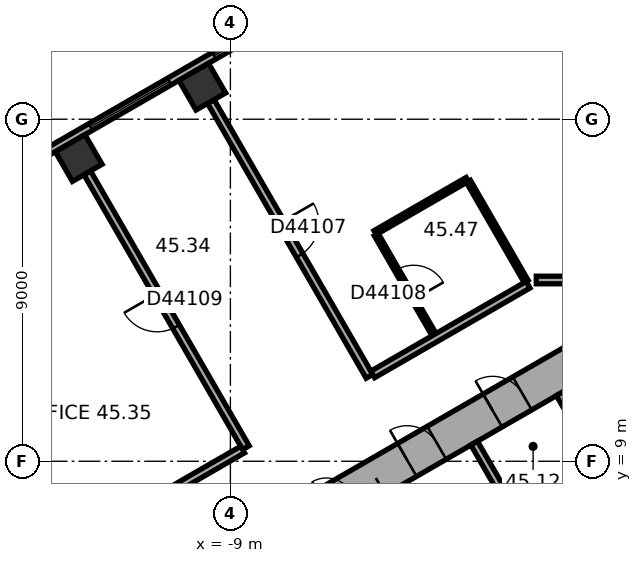
"""IFC4 building model, lengths in metres.
Left out: names, types, materials, properties, quantities, classifications, styles, units other than length and angle.
Written with IfcOpenShell. Run it as: python <this file> out.ifc"""

import sys

from ifc_helpers import new_model, si_unit, direction, frame, frame_2d, origin, origin_2d, place, context, subcontext, project, spatial, rectangle, extrude, element, fill, save


model = new_model("IFC4")
c1 = context("Model", 3, precision=1e-05, world=origin(), true_north=direction((0.0, 1.0)))
c2 = subcontext(c1, "Body", "Model", "MODEL_VIEW")
j1 = project(units=[si_unit("LENGTHUNIT", "METRE"), si_unit("PLANEANGLEUNIT", "RADIAN")], contexts=[c1])
p1 = place(None, origin())
s1 = spatial("IfcSite", under=j1, at=p1, CompositionType="ELEMENT")
p2 = place(p1, origin())
s2 = spatial("IfcBuilding", under=s1, at=p2, CompositionType="ELEMENT")
p3 = place(p2, frame((0.0, 0.0, 183.6)))
s3 = spatial("IfcBuildingStorey", under=s2, at=p3, CompositionType="ELEMENT", Elevation=183.6)
for number, where, z_axis, x_axis in (
    (1, (-9.74, 18.856, 0.0), (0.0, 0.0, 1.0), (-0.866, -0.5, 0.0)),
    (2, (-12.991, 16.979, 0.0), (0.0, 0.0, 1.0), (-0.866, -0.5, 0.0)),
):
    element("IfcColumn", number, at=place(p3, frame(where, z_axis=z_axis, x_axis=x_axis)), inside=s3, PredefinedType="COLUMN", context=c2, shape_type="SweptSolid", body=[
        extrude(rectangle(XDim=0.9, YDim=0.9, at=origin_2d()), origin(), (0.0, 0.0, 1.0), 3.7),
    ])
p4 = place(p3, frame((10.25, 5.629, 0.0), z_axis=(0.0, 0.0, 1.0), x_axis=(-0.866022616891, 0.50000482701, 0.0)))
e3 = element("IfcWall", 3, at=p4, inside=s3, PredefinedType="SHEAR", context=c2, shape_type="SweptSolid", body=[
    extrude(rectangle(XDim=12.125, YDim=1.0, at=frame_2d((6.062, 0.0))), origin(), (0.0, 0.0, 1.0), 3.7),
])
p5 = place(p4, frame((5.312, 0.0, 0.0)))
e4 = element("IfcOpeningElement", 4, at=p5, cuts=e3, PredefinedType="OPENING", context=c2, shape_type="SweptSolid", body=[
    extrude(rectangle(XDim=0.9, YDim=2.1, at=frame_2d((0.45, 1.05))), frame((0.0, 0.51, 0.0), z_axis=(0.0, -1.0, 0.0), x_axis=(1.0, 0.0, 0.0)), (0.0, 0.0, 1.0), 1.02),
])
p6 = place(p3, frame((0.25, 11.691, 0.0), z_axis=(0.0, 0.0, 1.0), x_axis=(-0.866022616891, -0.50000482701, 0.0)))
e5 = element("IfcWall", 5, at=p6, inside=s3, PredefinedType="SHEAR", context=c2, shape_type="SweptSolid", body=[
    extrude(rectangle(XDim=12.125, YDim=1.0, at=frame_2d((6.062, 0.0))), origin(), (0.0, 0.0, 1.0), 3.7),
])
p7 = place(p6, frame((6.262, 0.0, 0.0)))
e6 = element("IfcOpeningElement", 6, at=p7, cuts=e5, PredefinedType="OPENING", context=c2, shape_type="SweptSolid", body=[
    extrude(rectangle(XDim=1.5, YDim=2.1, at=frame_2d((0.75, 1.05))), frame((0.0, 0.51, 0.0), z_axis=(0.0, -1.0, 0.0), x_axis=(1.0, 0.0, 0.0)), (0.0, 0.0, 1.0), 1.02),
])
p8 = place(p6, frame((1.812, 0.0, 0.0)))
e7 = element("IfcOpeningElement", 7, at=p8, cuts=e5, PredefinedType="OPENING", context=c2, shape_type="SweptSolid", body=[
    extrude(rectangle(XDim=0.9, YDim=2.1, at=frame_2d((0.45, 1.05))), frame((0.0, 0.51, 0.0), z_axis=(0.0, -1.0, 0.0), x_axis=(1.0, 0.0, 0.0)), (0.0, 0.0, 1.0), 1.02),
])
p9 = place(p6, frame((4.412, 0.0, 0.0)))
e8 = element("IfcOpeningElement", 8, at=p9, cuts=e5, PredefinedType="OPENING", context=c2, shape_type="SweptSolid", body=[
    extrude(rectangle(XDim=0.9, YDim=2.1, at=frame_2d((0.45, 1.05))), frame((0.0, 0.51, 0.0), z_axis=(0.0, -1.0, 0.0), x_axis=(1.0, 0.0, 0.0)), (0.0, 0.0, 1.0), 1.02),
])
p10 = place(p3, frame((-2.961, 23.405, 0.0), z_axis=(0.0, 0.0, 1.0), x_axis=(-0.866023315909, -0.500003616288, 0.0)))
e9 = element("IfcWall", 9, at=p10, inside=s3, PredefinedType="STANDARD", context=c2, shape_type="SweptSolid", body=[
    extrude(rectangle(XDim=20.044, YDim=0.2, at=frame_2d((10.022, 0.0))), origin(), (0.0, 0.0, 1.0), 3.7),
])
p11 = place(p10, frame((1.314, 0.0, 0.9)))
e10 = element("IfcOpeningElement", 10, at=p11, cuts=e9, PredefinedType="OPENING", context=c2, shape_type="SweptSolid", body=[
    extrude(rectangle(XDim=2.4, YDim=2.0, at=frame_2d((1.2, 1.0))), frame((0.0, 0.11, 0.0), z_axis=(0.0, -1.0, 0.0), x_axis=(1.0, 0.0, 0.0)), (0.0, 0.0, 1.0), 0.22),
])
p12 = place(p10, frame((5.069, 0.0, 0.9)))
e11 = element("IfcOpeningElement", 11, at=p12, cuts=e9, PredefinedType="OPENING", context=c2, shape_type="SweptSolid", body=[
    extrude(rectangle(XDim=2.4, YDim=2.0, at=frame_2d((1.2, 1.0))), frame((0.0, 0.11, 0.0), z_axis=(0.0, -1.0, 0.0), x_axis=(1.0, 0.0, 0.0)), (0.0, 0.0, 1.0), 0.22),
])
p13 = place(p10, frame((8.823, 0.0, 0.9)))
e12 = element("IfcOpeningElement", 12, at=p13, cuts=e9, PredefinedType="OPENING", context=c2, shape_type="SweptSolid", body=[
    extrude(rectangle(XDim=2.4, YDim=2.0, at=frame_2d((1.2, 1.0))), frame((0.0, 0.11, 0.0), z_axis=(0.0, -1.0, 0.0), x_axis=(1.0, 0.0, 0.0)), (0.0, 0.0, 1.0), 0.22),
])
p14 = place(p10, frame((12.577, 0.0, 0.9)))
e13 = element("IfcOpeningElement", 13, at=p14, cuts=e9, PredefinedType="OPENING", context=c2, shape_type="SweptSolid", body=[
    extrude(rectangle(XDim=2.4, YDim=2.0, at=frame_2d((1.2, 1.0))), frame((0.0, 0.11, 0.0), z_axis=(0.0, -1.0, 0.0), x_axis=(1.0, 0.0, 0.0)), (0.0, 0.0, 1.0), 0.22),
])
p15 = place(p10, frame((16.331, 0.0, 0.9)))
e14 = element("IfcOpeningElement", 14, at=p15, cuts=e9, PredefinedType="OPENING", context=c2, shape_type="SweptSolid", body=[
    extrude(rectangle(XDim=2.4, YDim=2.0, at=frame_2d((1.2, 1.0))), frame((0.0, 0.11, 0.0), z_axis=(0.0, -1.0, 0.0), x_axis=(1.0, 0.0, 0.0)), (0.0, 0.0, 1.0), 0.22),
])
p16 = place(p3, frame((0.803, 9.009, 0.0), z_axis=(0.0, 0.0, 1.0), x_axis=(-0.866028230842, -0.499995103361, 0.0)))
e15 = element("IfcWall", 15, at=p16, inside=s3, PredefinedType="PARTITIONING", context=c2, shape_type="SweptSolid", body=[
    extrude(rectangle(XDim=5.4, YDim=0.2, at=frame_2d((2.7, 0.0))), origin(), (0.0, 0.0, 1.0), 3.42),
])
p17 = place(p3, frame((0.767, 8.872, 0.0), z_axis=(0.0, 0.0, 1.0), x_axis=(-0.499994660107, 0.866028486751, 0.0)))
e16 = element("IfcWall", 16, at=p17, inside=s3, PredefinedType="PARTITIONING", context=c2, shape_type="SweptSolid", body=[
    extrude(rectangle(XDim=2.2, YDim=0.2, at=frame_2d((1.1, 0.0))), origin(), (0.0, 0.0, 1.0), 3.42),
])
p18 = place(p3, frame((-1.485, 7.572, 0.0), z_axis=(0.0, 0.0, 1.0), x_axis=(-0.50002983664, 0.866008176907, 0.0)))
e17 = element("IfcWall", 17, at=p18, inside=s3, PredefinedType="PARTITIONING", context=c2, shape_type="SweptSolid", body=[
    extrude(rectangle(XDim=2.2, YDim=0.2, at=frame_2d((1.1, 0.0))), origin(), (0.0, 0.0, 1.0), 3.42),
])
p19 = place(p3, frame((-2.216, 4.282, 0.0), z_axis=(0.0, 0.0, 1.0), x_axis=(0.499977259774, 0.866038532462, 0.0)))
e18 = element("IfcWall", 18, at=p19, inside=s3, PredefinedType="SHEAR", context=c2, shape_type="SweptSolid", body=[
    extrude(rectangle(XDim=4.7, YDim=0.3, at=frame_2d((2.35, 0.0))), origin(), (0.0, 0.0, 1.0), 3.42),
])
p20 = place(p3, frame((-12.766, 16.589, 0.0), z_axis=(0.0, 0.0, 1.0), x_axis=(0.500010139422, -0.866019549707, 0.0)))
e19 = element("IfcWall", 19, at=p20, inside=s3, PredefinedType="PARTITIONING", context=c2, shape_type="SweptSolid", body=[
    extrude(rectangle(XDim=8.35, YDim=0.2, at=frame_2d((4.175, 0.0))), origin(), (0.0, 0.0, 1.0), 3.42),
])
p21 = place(p20, frame((3.675, 0.0, 0.0)))
e20 = element("IfcOpeningElement", 20, at=p21, cuts=e19, PredefinedType="OPENING", context=c2, shape_type="SweptSolid", body=[
    extrude(rectangle(XDim=1.0, YDim=2.1, at=frame_2d((0.5, 1.05))), frame((0.0, 0.11, 0.0), z_axis=(0.0, -1.0, 0.0), x_axis=(1.0, 0.0, 0.0)), (0.0, 0.0, 1.0), 0.22),
])
p22 = place(p3, frame((-9.515, 18.466, 0.0), z_axis=(0.0, 0.0, 1.0), x_axis=(0.500010139422, -0.866019549707, 0.0)))
e21 = element("IfcWall", 21, at=p22, inside=s3, PredefinedType="PARTITIONING", context=c2, shape_type="SweptSolid", body=[
    extrude(rectangle(XDim=8.35, YDim=0.2, at=frame_2d((4.175, 0.0))), origin(), (0.0, 0.0, 1.0), 2.87),
])
p23 = place(p22, frame((3.675, 0.0, 0.0)))
e22 = element("IfcOpeningElement", 22, at=p23, cuts=e21, PredefinedType="OPENING", context=c2, shape_type="SweptSolid", body=[
    extrude(rectangle(XDim=1.0, YDim=2.1, at=frame_2d((0.5, 1.05))), frame((0.0, 0.11, 0.0), z_axis=(0.0, -1.0, 0.0), x_axis=(1.0, 0.0, 0.0)), (0.0, 0.0, 1.0), 0.22),
])
p24 = place(p3, frame((-8.678, 9.308, 0.0), z_axis=(0.0, 0.0, 1.0), x_axis=(-0.866000359435, -0.500043375578, 0.0)))
e23 = element("IfcWall", 23, at=p24, inside=s3, PredefinedType="PARTITIONING", context=c2, shape_type="SweptSolid", body=[
    extrude(rectangle(XDim=3.161, YDim=0.2, at=frame_2d((1.581, 0.0))), origin(), (0.0, 0.0, 1.0), 3.42),
])
p25 = place(p3, frame((-5.191, 15.016, 0.0), z_axis=(0.0, 0.0, 1.0), x_axis=(0.866034573852, 0.49998411664, 0.0)))
e24 = element("IfcWall", 24, at=p25, inside=s3, PredefinedType="PARTITIONING", context=c2, shape_type="SweptSolid", body=[
    extrude(rectangle(XDim=2.8, YDim=0.12, at=frame_2d((1.4, 0.0))), origin(), (0.0, 0.0, 1.0), 3.42),
])
p26 = place(p3, frame((-3.641, 12.331, 0.0), z_axis=(0.0, 0.0, 1.0), x_axis=(-0.499991248344, 0.866030456496, 0.0)))
e25 = element("IfcWall", 25, at=p26, inside=s3, PredefinedType="PARTITIONING", context=c2, shape_type="SweptSolid", body=[
    extrude(rectangle(XDim=3.04, YDim=0.12, at=frame_2d((1.52, 0.0))), origin(), (0.0, 0.0, 1.0), 3.42),
])
p27 = place(p26, frame((1.07, 0.0, 0.0)))
e26 = element("IfcOpeningElement", 26, at=p27, cuts=e25, PredefinedType="OPENING", context=c2, shape_type="SweptSolid", body=[
    extrude(rectangle(XDim=0.9, YDim=2.1, at=frame_2d((0.45, 1.05))), frame((0.0, 0.07, 0.0), z_axis=(0.0, -1.0, 0.0), x_axis=(1.0, 0.0, 0.0)), (0.0, 0.0, 1.0), 0.14),
])
p28 = place(p3, frame((-2.737, 16.364, 0.0), z_axis=(0.0, 0.0, 1.0), x_axis=(0.500026023896, -0.86601037836, 0.0)))
e27 = element("IfcWall", 27, at=p28, inside=s3, PredefinedType="PARTITIONING", context=c2, shape_type="SweptSolid", body=[
    extrude(rectangle(XDim=3.04, YDim=0.12, at=frame_2d((1.52, 0.0))), origin(), (0.0, 0.0, 1.0), 3.42),
])
p29 = place(p3, frame((-1.167, 13.645, 0.0), z_axis=(0.0, 0.0, 1.0), x_axis=(-0.866034830959, -0.499983671299, 0.0)))
e28 = element("IfcWall", 28, at=p29, inside=s3, PredefinedType="PARTITIONING", context=c2, shape_type="SweptSolid", body=[
    extrude(rectangle(XDim=4.719, YDim=0.2, at=frame_2d((2.36, 0.0))), origin(), (0.0, 0.0, 1.0), 3.42),
])
p30 = place(p3, frame((0.95, 13.77, 0.0), z_axis=(0.0, 0.0, 1.0), x_axis=(-1.0, 0.0, 0.0)))
e29 = element("IfcWall", 29, at=p30, inside=s3, PredefinedType="PARTITIONING", context=c2, shape_type="SweptSolid", body=[
    extrude(rectangle(XDim=1.9, YDim=0.2, at=frame_2d((0.95, 0.0))), origin(), (0.0, 0.0, 1.0), 3.42),
])
p31 = place(p12, origin())
e30 = element("IfcWindow", 30, at=p31, inside=s3, PartitioningType="SINGLE_PANEL", PredefinedType="WINDOW", context=c2, shape_type="SweptSolid", body=[
    extrude(rectangle(XDim=2.4, YDim=2.0, at=frame_2d((1.2, 1.0))), frame((0.0, 0.03, 0.0), z_axis=(0.0, -1.0, 0.0), x_axis=(1.0, 0.0, 0.0)), (0.0, 0.0, 1.0), 0.06),
])
fill(e11, e30)
p32 = place(p13, origin())
e31 = element("IfcWindow", 31, at=p32, inside=s3, PartitioningType="SINGLE_PANEL", PredefinedType="WINDOW", context=c2, shape_type="SweptSolid", body=[
    extrude(rectangle(XDim=2.4, YDim=2.0, at=frame_2d((1.2, 1.0))), frame((0.0, 0.03, 0.0), z_axis=(0.0, -1.0, 0.0), x_axis=(1.0, 0.0, 0.0)), (0.0, 0.0, 1.0), 0.06),
])
fill(e12, e31)
p33 = place(p7, origin())
e32 = element("IfcDoor", 32, at=p33, inside=s3, OperationType="DOUBLE_DOOR_SINGLE_SWING", PredefinedType="DOOR", context=c2, shape_type="SweptSolid", body=[
    extrude(rectangle(XDim=1.5, YDim=2.1, at=frame_2d((0.75, 1.05))), frame((0.0, 0.025, 0.0), z_axis=(0.0, -1.0, 0.0), x_axis=(1.0, 0.0, 0.0)), (0.0, 0.0, 1.0), 0.05),
])
fill(e6, e32)
p34 = place(p8, origin())
e33 = element("IfcDoor", 33, at=p34, inside=s3, OperationType="SINGLE_SWING_LEFT", PredefinedType="DOOR", context=c2, shape_type="SweptSolid", body=[
    extrude(rectangle(XDim=0.9, YDim=2.1, at=frame_2d((0.45, 1.05))), frame((0.0, 0.025, 0.0), z_axis=(0.0, -1.0, 0.0), x_axis=(1.0, 0.0, 0.0)), (0.0, 0.0, 1.0), 0.05),
])
fill(e7, e33)
p35 = place(p9, origin())
e34 = element("IfcDoor", 34, at=p35, inside=s3, OperationType="SINGLE_SWING_LEFT", PredefinedType="DOOR", context=c2, shape_type="SweptSolid", body=[
    extrude(rectangle(XDim=0.9, YDim=2.1, at=frame_2d((0.45, 1.05))), frame((0.0, 0.025, 0.0), z_axis=(0.0, -1.0, 0.0), x_axis=(1.0, 0.0, 0.0)), (0.0, 0.0, 1.0), 0.05),
])
fill(e8, e34)
p36 = place(p23, origin())
e35 = element("IfcDoor", 35, at=p36, inside=s3, OperationType="SINGLE_SWING_LEFT", PredefinedType="DOOR", context=c2, shape_type="SweptSolid", body=[
    extrude(rectangle(XDim=1.0, YDim=2.1, at=frame_2d((0.5, 1.05))), frame((0.0, 0.025, 0.0), z_axis=(0.0, -1.0, 0.0), x_axis=(1.0, 0.0, 0.0)), (0.0, 0.0, 1.0), 0.05),
])
fill(e22, e35)
p37 = place(p27, origin())
e36 = element("IfcDoor", 36, at=p37, inside=s3, OperationType="SINGLE_SWING_LEFT", PredefinedType="DOOR", context=c2, shape_type="SweptSolid", body=[
    extrude(rectangle(XDim=0.9, YDim=2.1, at=frame_2d((0.45, 1.05))), frame((0.0, 0.025, 0.0), z_axis=(0.0, -1.0, 0.0), x_axis=(1.0, 0.0, 0.0)), (0.0, 0.0, 1.0), 0.05),
])
fill(e26, e36)
p38 = place(p21, origin())
e37 = element("IfcDoor", 37, at=p38, inside=s3, OperationType="SINGLE_SWING_LEFT", PredefinedType="DOOR", context=c2, shape_type="SweptSolid", body=[
    extrude(rectangle(XDim=1.0, YDim=2.1, at=frame_2d((0.5, 1.05))), frame((0.0, 0.025, 0.0), z_axis=(0.0, -1.0, 0.0), x_axis=(1.0, 0.0, 0.0)), (0.0, 0.0, 1.0), 0.05),
])
fill(e20, e37)
save(model, sys.argv[1])
